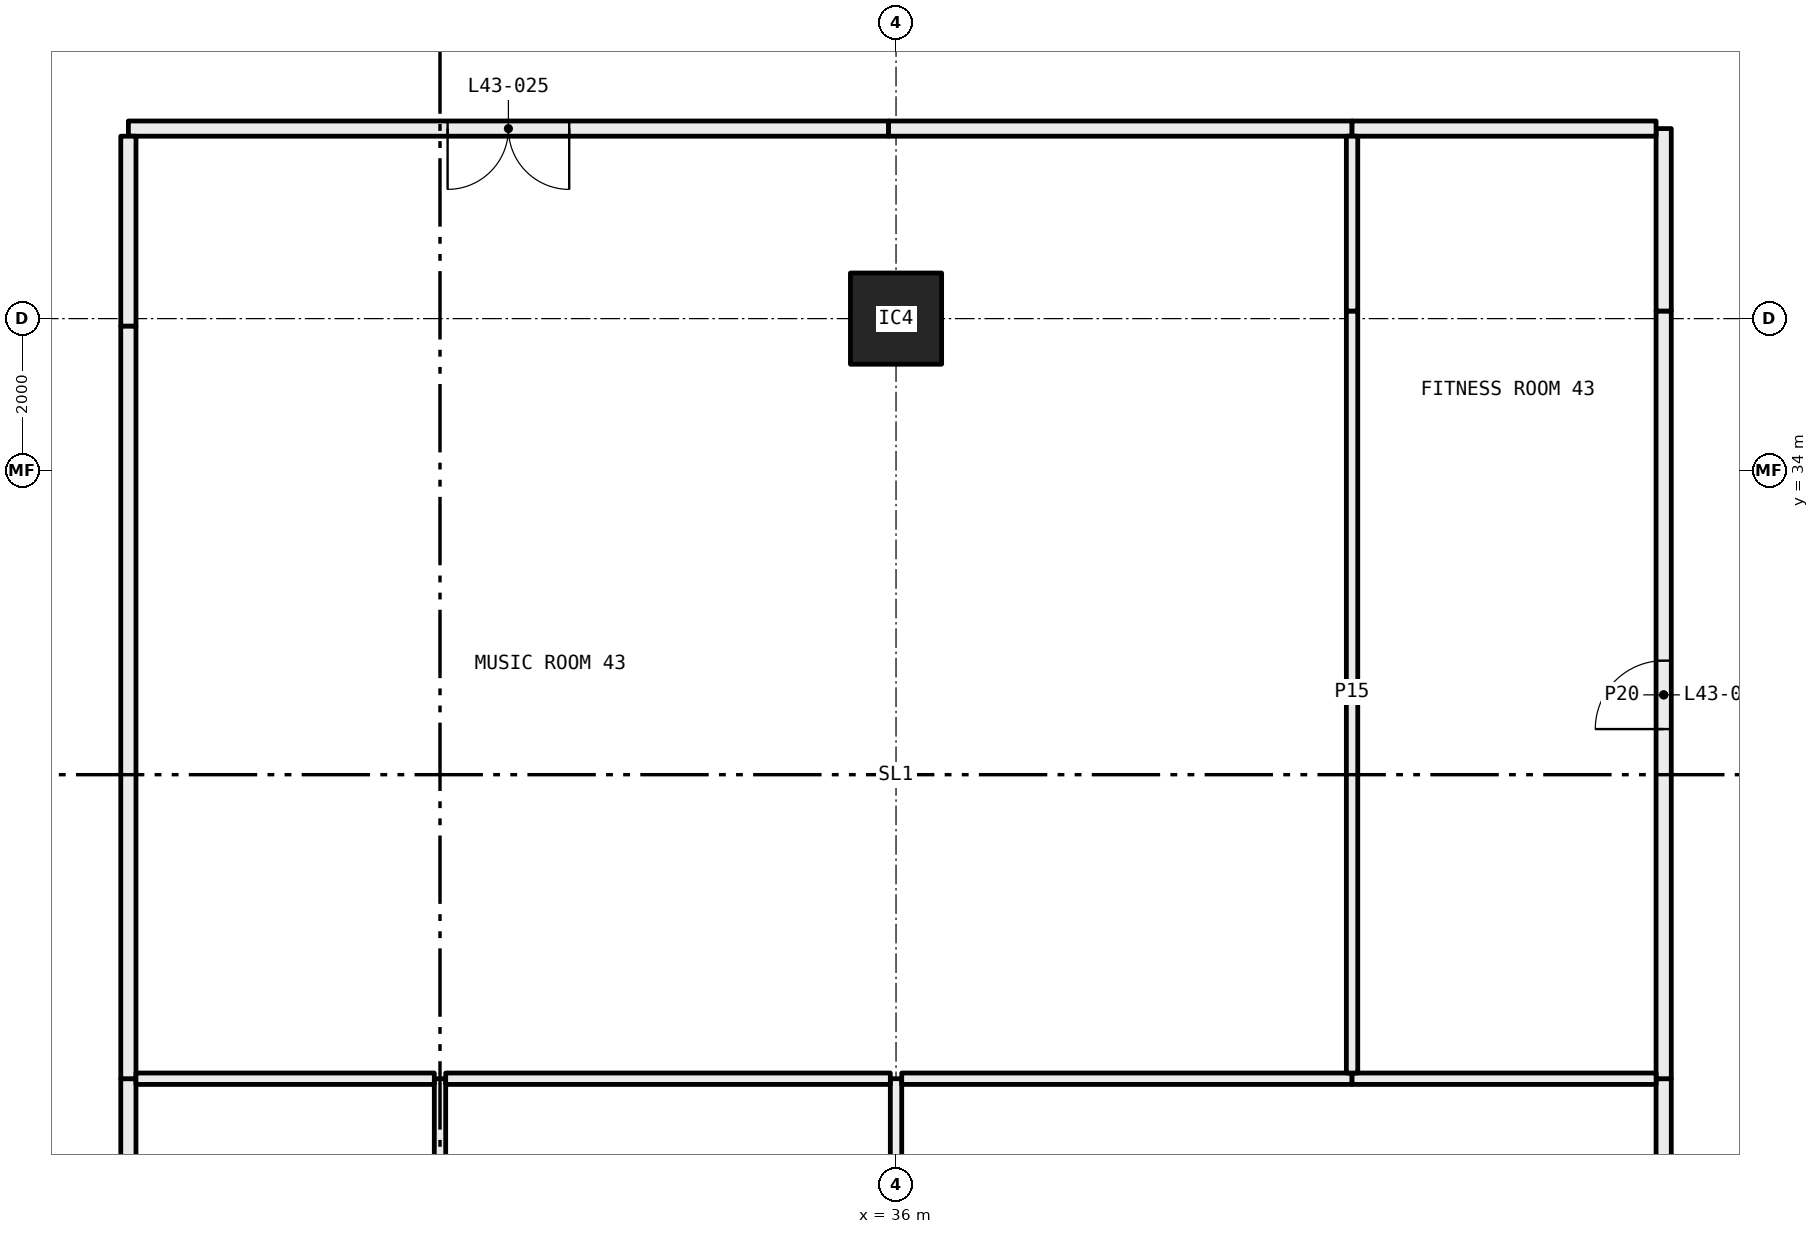
"""IFC4 building model, lengths in metres.
Left out: names, types, materials, properties, quantities, classifications, styles, units other than length and angle.
Written with IfcOpenShell. Run it as: python <this file> out.ifc"""

import sys

from ifc_helpers import new_model, si_unit, direction, frame, frame_2d, origin, origin_2d, place, context, subcontext, project, spatial, rectangle, hollow_rectangle, extrude, element, fill, save


model = new_model("IFC4")
c1 = context("Model", 3, precision=1e-05, world=origin(), true_north=direction((0.0, 1.0)))
c2 = subcontext(c1, "Body", "Model", "MODEL_VIEW")
j1 = project(units=[si_unit("LENGTHUNIT", "METRE"), si_unit("PLANEANGLEUNIT", "RADIAN")], contexts=[c1])
p1 = place(None, origin())
s1 = spatial("IfcSite", under=j1, at=p1, CompositionType="ELEMENT")
p2 = place(p1, origin())
s2 = spatial("IfcBuilding", under=s1, at=p2, CompositionType="ELEMENT")
p3 = place(p2, frame((0.0, 0.0, 165.15)))
s3 = spatial("IfcBuildingStorey", under=s2, at=p3, CompositionType="ELEMENT", Elevation=165.15)
p4 = place(p3, frame((36.0, 36.0, 0.0), z_axis=(0.0, 0.0, 1.0), x_axis=(1.0, 0.0, 0.0)))
e1 = element("IfcColumn", 1, at=p4, inside=s3, PredefinedType="COLUMN", context=c2, shape_type="SweptSolid", body=[
    extrude(hollow_rectangle(XDim=1.2, YDim=1.2, WallThickness=0.05, at=origin_2d()), origin(), (0.0, 0.0, 1.0), 3.05),
])
p5 = place(p3, frame((25.9, 26.0, 0.0), z_axis=(0.0, 0.0, 1.0), x_axis=(0.0, -1.0, 0.0)))
e2 = element("IfcWall", 2, at=p5, inside=s3, PredefinedType="PARTITIONING", context=c2, shape_type="SweptSolid", body=[
    extrude(rectangle(XDim=2.1, YDim=0.2, at=frame_2d((1.05, 0.0))), origin(), (0.0, 0.0, 1.0), 2.45),
])
p6 = place(p3, frame((46.1, 24.1, 0.0), z_axis=(0.0, 0.0, 1.0), x_axis=(0.0, 1.0, 0.0)))
e3 = element("IfcWall", 3, at=p6, inside=s3, PredefinedType="PARTITIONING", context=c2, shape_type="SweptSolid", body=[
    extrude(rectangle(XDim=1.9, YDim=0.2, at=frame_2d((0.95, 0.0))), origin(), (0.0, 0.0, 1.0), 3.05),
])
p7 = place(p3, frame((42.0, 38.5, 0.0), z_axis=(0.0, 0.0, 1.0), x_axis=(-1.0, 0.0, 0.0)))
e4 = element("IfcWall", 4, at=p7, inside=s3, PredefinedType="PARTITIONING", context=c2, shape_type="SweptSolid", body=[
    extrude(rectangle(XDim=6.1, YDim=0.2, at=frame_2d((3.05, 0.0))), origin(), (0.0, 0.0, 1.0), 2.45),
])
p8 = place(p3, frame((35.9, 38.5, 0.0), z_axis=(0.0, 0.0, 1.0), x_axis=(-1.0, 0.0, 0.0)))
e5 = element("IfcWall", 5, at=p8, inside=s3, PredefinedType="PARTITIONING", context=c2, shape_type="SweptSolid", body=[
    extrude(rectangle(XDim=10.0, YDim=0.2, at=frame_2d((5.0, 0.0))), origin(), (0.0, 0.0, 1.0), 3.05),
])
p9 = place(p8, frame((4.2, 0.0, 0.0)))
e6 = element("IfcOpeningElement", 6, at=p9, cuts=e5, PredefinedType="OPENING", context=c2, shape_type="SweptSolid", body=[
    extrude(rectangle(XDim=1.6, YDim=2.1, at=frame_2d((0.8, 1.05))), frame((0.0, 0.11, 0.0), z_axis=(0.0, -1.0, 0.0), x_axis=(1.0, 0.0, 0.0)), (0.0, 0.0, 1.0), 0.22),
])
p10 = place(p3, frame((25.9, 38.4, 0.0), z_axis=(0.0, 0.0, 1.0), x_axis=(0.0, -1.0, 0.0)))
e7 = element("IfcWall", 7, at=p10, inside=s3, PredefinedType="PARTITIONING", context=c2, shape_type="SweptSolid", body=[
    extrude(rectangle(XDim=2.5, YDim=0.2, at=frame_2d((1.25, 0.0))), origin(), (0.0, 0.0, 1.0), 2.45),
])
p11 = place(p3, frame((25.9, 35.9, 0.0), z_axis=(0.0, 0.0, 1.0), x_axis=(0.0, -1.0, 0.0)))
e8 = element("IfcWall", 8, at=p11, inside=s3, PredefinedType="PARTITIONING", context=c2, shape_type="SweptSolid", body=[
    extrude(rectangle(XDim=9.9, YDim=0.2, at=frame_2d((4.95, 0.0))), origin(), (0.0, 0.0, 1.0), 3.05),
])
p12 = place(p3, frame((46.1, 26.0, 0.0), z_axis=(0.0, 0.0, 1.0), x_axis=(0.0, 1.0, 0.0)))
e9 = element("IfcWall", 9, at=p12, inside=s3, PredefinedType="PARTITIONING", context=c2, shape_type="SweptSolid", body=[
    extrude(rectangle(XDim=10.1, YDim=0.2, at=frame_2d((5.05, 0.0))), origin(), (0.0, 0.0, 1.0), 2.45),
])
p13 = place(p12, frame((4.6, 0.0, 0.0)))
e10 = element("IfcOpeningElement", 10, at=p13, cuts=e9, PredefinedType="OPENING", context=c2, shape_type="SweptSolid", body=[
    extrude(rectangle(XDim=0.9, YDim=2.1, at=frame_2d((0.45, 1.05))), frame((0.0, 0.11, 0.0), z_axis=(0.0, -1.0, 0.0), x_axis=(1.0, 0.0, 0.0)), (0.0, 0.0, 1.0), 0.22),
])
p14 = place(p3, frame((46.1, 36.1, 0.0), z_axis=(0.0, 0.0, 1.0), x_axis=(0.0, 1.0, 0.0)))
e11 = element("IfcWall", 11, at=p14, inside=s3, PredefinedType="PARTITIONING", context=c2, shape_type="SweptSolid", body=[
    extrude(rectangle(XDim=2.4, YDim=0.2, at=frame_2d((1.2, 0.0))), origin(), (0.0, 0.0, 1.0), 3.05),
])
p15 = place(p3, frame((46.0, 38.5, 0.0), z_axis=(0.0, 0.0, 1.0), x_axis=(-1.0, 0.0, 0.0)))
e12 = element("IfcWall", 12, at=p15, inside=s3, PredefinedType="PARTITIONING", context=c2, shape_type="SweptSolid", body=[
    extrude(rectangle(XDim=4.0, YDim=0.2, at=frame_2d((2.0, 0.0))), origin(), (0.0, 0.0, 1.0), 3.05),
])
p16 = place(p3, frame((30.0, 24.1, 0.0), z_axis=(0.0, 0.0, 1.0), x_axis=(0.0, 1.0, 0.0)))
e13 = element("IfcWall", 13, at=p16, inside=s3, PredefinedType="PARTITIONING", context=c2, shape_type="SweptSolid", body=[
    extrude(rectangle(XDim=1.9, YDim=0.15, at=frame_2d((0.95, 0.0))), origin(), (0.0, 0.0, 1.0), 3.05),
])
p17 = place(p3, frame((29.925, 26.0, 0.0), z_axis=(0.0, 0.0, 1.0), x_axis=(-1.0, 0.0, 0.0)))
e14 = element("IfcWall", 14, at=p17, inside=s3, PredefinedType="PARTITIONING", context=c2, shape_type="SweptSolid", body=[
    extrude(rectangle(XDim=3.925, YDim=0.15, at=frame_2d((1.962, 0.0))), origin(), (0.0, 0.0, 1.0), 3.05),
])
p18 = place(p3, frame((36.0, 24.65, 0.0), z_axis=(0.0, 0.0, 1.0), x_axis=(0.0, 1.0, 0.0)))
e15 = element("IfcWall", 15, at=p18, inside=s3, PredefinedType="PARTITIONING", context=c2, shape_type="SweptSolid", body=[
    extrude(rectangle(XDim=1.35, YDim=0.15, at=frame_2d((0.675, 0.0))), origin(), (0.0, 0.0, 1.0), 2.45),
])
p19 = place(p3, frame((35.925, 26.0, 0.0), z_axis=(0.0, 0.0, 1.0), x_axis=(-1.0, 0.0, 0.0)))
e16 = element("IfcWall", 16, at=p19, inside=s3, PredefinedType="PARTITIONING", context=c2, shape_type="SweptSolid", body=[
    extrude(rectangle(XDim=5.85, YDim=0.15, at=frame_2d((2.925, 0.0))), origin(), (0.0, 0.0, 1.0), 2.45),
])
p20 = place(p3, frame((42.0, 26.0, 0.0), z_axis=(0.0, 0.0, 1.0), x_axis=(-1.0, 0.0, 0.0)))
e17 = element("IfcWall", 17, at=p20, inside=s3, PredefinedType="PARTITIONING", context=c2, shape_type="SweptSolid", body=[
    extrude(rectangle(XDim=5.925, YDim=0.15, at=frame_2d((2.962, 0.0))), origin(), (0.0, 0.0, 1.0), 2.45),
])
p21 = place(p3, frame((46.0, 26.0, 0.0), z_axis=(0.0, 0.0, 1.0), x_axis=(-1.0, 0.0, 0.0)))
e18 = element("IfcWall", 18, at=p21, inside=s3, PredefinedType="PARTITIONING", context=c2, shape_type="SweptSolid", body=[
    extrude(rectangle(XDim=4.0, YDim=0.15, at=frame_2d((2.0, 0.0))), origin(), (0.0, 0.0, 1.0), 3.05),
])
p22 = place(p3, frame((42.0, 26.075, 0.0), z_axis=(0.0, 0.0, 1.0), x_axis=(0.0, 1.0, 0.0)))
e19 = element("IfcWall", 19, at=p22, inside=s3, PredefinedType="PARTITIONING", context=c2, shape_type="SweptSolid", body=[
    extrude(rectangle(XDim=10.025, YDim=0.15, at=frame_2d((5.013, 0.0))), origin(), (0.0, 0.0, 1.0), 2.45),
])
p23 = place(p3, frame((42.0, 36.1, 0.0), z_axis=(0.0, 0.0, 1.0), x_axis=(0.0, 1.0, 0.0)))
e20 = element("IfcWall", 20, at=p23, inside=s3, PredefinedType="PARTITIONING", context=c2, shape_type="SweptSolid", body=[
    extrude(rectangle(XDim=2.3, YDim=0.15, at=frame_2d((1.15, 0.0))), origin(), (0.0, 0.0, 1.0), 3.05),
])
p24 = place(p9, origin())
e21 = element("IfcDoor", 21, at=p24, inside=s3, OperationType="DOUBLE_DOOR_SINGLE_SWING", PredefinedType="DOOR", context=c2, shape_type="SweptSolid", body=[
    extrude(rectangle(XDim=1.6, YDim=2.1, at=frame_2d((0.8, 1.05))), frame((0.0, 0.025, 0.0), z_axis=(0.0, -1.0, 0.0), x_axis=(1.0, 0.0, 0.0)), (0.0, 0.0, 1.0), 0.05),
])
fill(e6, e21)
p25 = place(p13, origin())
e22 = element("IfcDoor", 22, at=p25, inside=s3, OperationType="SINGLE_SWING_RIGHT", PredefinedType="DOOR", context=c2, shape_type="SweptSolid", body=[
    extrude(rectangle(XDim=0.9, YDim=2.1, at=frame_2d((0.45, 1.05))), frame((0.0, 0.025, 0.0), z_axis=(0.0, -1.0, 0.0), x_axis=(1.0, 0.0, 0.0)), (0.0, 0.0, 1.0), 0.05),
])
fill(e10, e22)
save(model, sys.argv[1])
